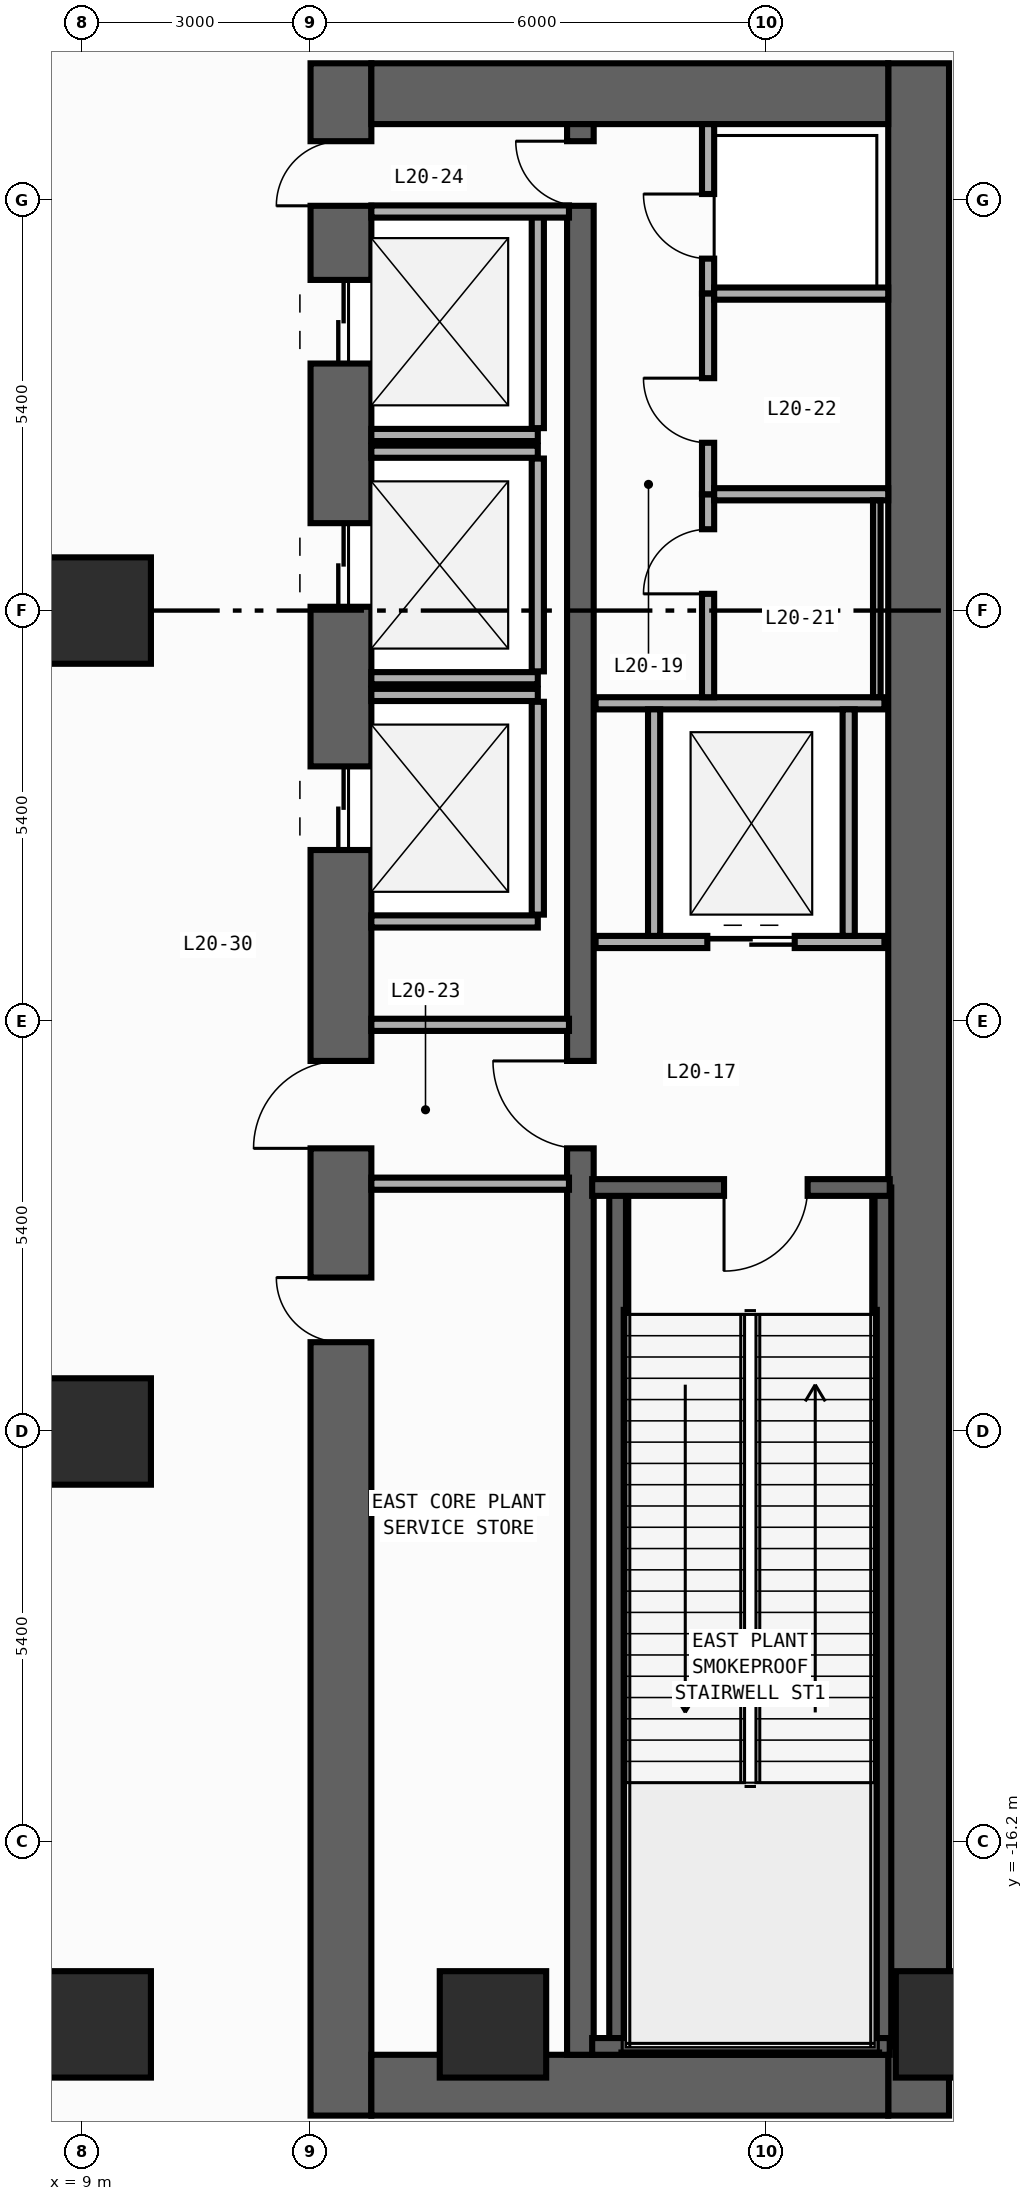
"""IFC4 building model, lengths in metres.
Left out: names, types, materials, properties, quantities, classifications, styles, units other than length and angle.
Written with IfcOpenShell. Run it as: python <this file> out.ifc"""

import sys

from ifc_helpers import new_model, si_unit, direction, frame, frame_2d, origin, origin_2d, place, context, subcontext, project, spatial, rectangle, extrude, element, fill, save


model = new_model("IFC4")
c1 = context("Model", 3, precision=1e-05, world=origin(), true_north=direction((0.0, 1.0)))
c2 = subcontext(c1, "Body", "Model", "MODEL_VIEW")
j1 = project(units=[si_unit("LENGTHUNIT", "METRE"), si_unit("PLANEANGLEUNIT", "RADIAN")], contexts=[c1])
p1 = place(None, origin())
s1 = spatial("IfcSite", under=j1, at=p1, CompositionType="ELEMENT")
p2 = place(p1, origin())
s2 = spatial("IfcBuilding", under=s1, at=p2, CompositionType="ELEMENT")
p3 = place(p2, frame((0.0, 0.0, 84.8)))
s3 = spatial("IfcBuildingStorey", under=s2, at=p3, CompositionType="ELEMENT", Elevation=84.8)
p4 = place(p3, frame((12.4, -19.8, 0.0), z_axis=(0.0, 0.0, 1.0), x_axis=(0.0, 1.0, 0.0)))
e1 = element("IfcWall", 1, at=p4, inside=s3, PredefinedType="SHEAR", context=c2, shape_type="SweptSolid", body=[
    extrude(rectangle(XDim=27.0, YDim=0.8, at=frame_2d((13.5, 0.0))), origin(), (0.0, 0.0, 1.0), 8.14),
])
p5 = place(p4, frame((23.05, 0.0, 0.0)))
e2 = element("IfcOpeningElement", 2, at=p5, cuts=e1, PredefinedType="OPENING", context=c2, shape_type="SweptSolid", body=[
    extrude(rectangle(XDim=1.1, YDim=2.2, at=frame_2d((0.55, 1.1))), frame((0.0, 0.41, 0.0), z_axis=(0.0, -1.0, 0.0), x_axis=(1.0, 0.0, 0.0)), (0.0, 0.0, 1.0), 0.82),
])
p6 = place(p4, frame((19.85, 0.0, 0.0)))
e3 = element("IfcOpeningElement", 3, at=p6, cuts=e1, PredefinedType="OPENING", context=c2, shape_type="SweptSolid", body=[
    extrude(rectangle(XDim=1.1, YDim=2.2, at=frame_2d((0.55, 1.1))), frame((0.0, 0.41, 0.0), z_axis=(0.0, -1.0, 0.0), x_axis=(1.0, 0.0, 0.0)), (0.0, 0.0, 1.0), 0.82),
])
p7 = place(p4, frame((16.65, 0.0, 0.0)))
e4 = element("IfcOpeningElement", 4, at=p7, cuts=e1, PredefinedType="OPENING", context=c2, shape_type="SweptSolid", body=[
    extrude(rectangle(XDim=1.1, YDim=2.2, at=frame_2d((0.55, 1.1))), frame((0.0, 0.41, 0.0), z_axis=(0.0, -1.0, 0.0), x_axis=(1.0, 0.0, 0.0)), (0.0, 0.0, 1.0), 0.82),
])
p8 = place(p4, frame((10.175, 0.0, 0.0)))
e5 = element("IfcOpeningElement", 5, at=p8, cuts=e1, PredefinedType="OPENING", context=c2, shape_type="SweptSolid", body=[
    extrude(rectangle(XDim=0.85, YDim=2.1, at=frame_2d((0.425, 1.05))), frame((0.0, 0.41, 0.0), z_axis=(0.0, -1.0, 0.0), x_axis=(1.0, 0.0, 0.0)), (0.0, 0.0, 1.0), 0.82),
])
p9 = place(p4, frame((12.725, 0.0, 0.0)))
e6 = element("IfcOpeningElement", 6, at=p9, cuts=e1, PredefinedType="OPENING", context=c2, shape_type="SweptSolid", body=[
    extrude(rectangle(XDim=1.15, YDim=2.2, at=frame_2d((0.575, 1.1))), frame((0.0, 0.41, 0.0), z_axis=(0.0, -1.0, 0.0), x_axis=(1.0, 0.0, 0.0)), (0.0, 0.0, 1.0), 0.82),
])
p10 = place(p4, frame((25.125, 0.0, 0.0)))
e7 = element("IfcOpeningElement", 7, at=p10, cuts=e1, PredefinedType="OPENING", context=c2, shape_type="SweptSolid", body=[
    extrude(rectangle(XDim=0.85, YDim=2.1, at=frame_2d((0.425, 1.05))), frame((0.0, 0.41, 0.0), z_axis=(0.0, -1.0, 0.0), x_axis=(1.0, 0.0, 0.0)), (0.0, 0.0, 1.0), 0.82),
])
p11 = place(p3, frame((20.0, -19.8, 0.0), z_axis=(0.0, 0.0, 1.0), x_axis=(0.0, 1.0, 0.0)))
e8 = element("IfcWall", 8, at=p11, inside=s3, PredefinedType="SHEAR", context=c2, shape_type="SweptSolid", body=[
    extrude(rectangle(XDim=27.0, YDim=0.8, at=frame_2d((13.5, 0.0))), origin(), (0.0, 0.0, 1.0), 8.14),
])
for number, where, z_axis, x_axis in (
    (9, (12.8, -19.4, 0.0), (0.0, 0.0, 1.0), (1.0, 0.0, 0.0)),
    (10, (12.8, 6.8, 0.0), (0.0, 0.0, 1.0), (1.0, 0.0, 0.0)),
):
    element("IfcWall", number, at=place(p3, frame(where, z_axis=z_axis, x_axis=x_axis)), inside=s3, PredefinedType="SHEAR", context=c2, shape_type="SweptSolid", body=[
        extrude(rectangle(XDim=6.8, YDim=0.8, at=frame_2d((3.4, 0.0))), origin(), (0.0, 0.0, 1.0), 8.14),
    ])
p12 = place(p3, frame((15.55, -19.0, 0.0), z_axis=(0.0, 0.0, 1.0), x_axis=(0.0, 1.0, 0.0)))
e11 = element("IfcWall", 11, at=p12, inside=s3, PredefinedType="SHEAR", context=c2, shape_type="SweptSolid", body=[
    extrude(rectangle(XDim=25.4, YDim=0.35, at=frame_2d((12.7, 0.0))), origin(), (0.0, 0.0, 1.0), 8.14),
])
p13 = place(p12, frame((11.925, 0.0, 0.0)))
e12 = element("IfcOpeningElement", 12, at=p13, cuts=e11, PredefinedType="OPENING", context=c2, shape_type="SweptSolid", body=[
    extrude(rectangle(XDim=1.15, YDim=2.2, at=frame_2d((0.575, 1.1))), frame((0.0, 0.185, 0.0), z_axis=(0.0, -1.0, 0.0), x_axis=(1.0, 0.0, 0.0)), (0.0, 0.0, 1.0), 0.37),
])
p14 = place(p12, frame((24.325, 0.0, 0.0)))
e13 = element("IfcOpeningElement", 13, at=p14, cuts=e11, PredefinedType="OPENING", context=c2, shape_type="SweptSolid", body=[
    extrude(rectangle(XDim=0.85, YDim=2.1, at=frame_2d((0.425, 1.05))), frame((0.0, 0.185, 0.0), z_axis=(0.0, -1.0, 0.0), x_axis=(1.0, 0.0, 0.0)), (0.0, 0.0, 1.0), 0.37),
])
for number, where, z_axis, x_axis in (
    (14, (16.04, -18.89, 0.0), (0.0, 0.0, 1.0), (0.0, 1.0, 0.0)),
    (15, (19.53, -18.89, 0.0), (0.0, 0.0, 1.0), (0.0, 1.0, 0.0)),
):
    element("IfcWall", number, at=place(p3, frame(where, z_axis=z_axis, x_axis=x_axis)), inside=s3, PredefinedType="SHEAR", context=c2, shape_type="SweptSolid", body=[
        extrude(rectangle(XDim=11.3, YDim=0.22, at=frame_2d((5.65, 0.0))), origin(), (0.0, 0.0, 1.0), 8.14),
    ])
p15 = place(p3, frame((15.705, -18.89, 0.0), z_axis=(0.0, 0.0, 1.0), x_axis=(1.0, 0.0, 0.0)))
e16 = element("IfcWall", 16, at=p15, inside=s3, PredefinedType="SHEAR", context=c2, shape_type="SweptSolid", body=[
    extrude(rectangle(XDim=3.915, YDim=0.22, at=frame_2d((1.958, 0.0))), origin(), (0.0, 0.0, 1.0), 8.14),
])
p16 = place(p3, frame((19.62, -7.59, 0.0), z_axis=(0.0, 0.0, 1.0), x_axis=(-1.0, 0.0, 0.0)))
e17 = element("IfcWall", 17, at=p16, inside=s3, PredefinedType="SHEAR", context=c2, shape_type="SweptSolid", body=[
    extrude(rectangle(XDim=3.915, YDim=0.22, at=frame_2d((1.958, 0.0))), origin(), (0.0, 0.0, 1.0), 8.14),
])
p17 = place(p16, frame((1.08, 0.0, 0.0)))
e18 = element("IfcOpeningElement", 18, at=p17, cuts=e17, PredefinedType="OPENING", context=c2, shape_type="SweptSolid", body=[
    extrude(rectangle(XDim=1.1, YDim=2.2, at=frame_2d((0.55, 1.1))), frame((0.0, 0.12, 0.0), z_axis=(0.0, -1.0, 0.0), x_axis=(1.0, 0.0, 0.0)), (0.0, 0.0, 1.0), 0.24),
])
for number, where, z_axis, x_axis in (
    (19, (9.2, -18.6, 0.0), (0.0, 0.0, 1.0), (1.0, 0.0, 0.0)),
    (20, (9.2, -10.8, 0.0), (0.0, 0.0, 1.0), (1.0, 0.0, 0.0)),
    (21, (9.2, 0.0, 0.0), (0.0, 0.0, 1.0), (1.0, 0.0, 0.0)),
    (22, (20.4, -18.6, 0.0), (0.0, 0.0, 1.0), (1.0, 0.0, 0.0)),
    (23, (14.4, -18.6, 0.0), (0.0, 0.0, 1.0), (1.0, 0.0, 0.0)),
):
    element("IfcColumn", number, at=place(p3, frame(where, z_axis=z_axis, x_axis=x_axis)), inside=s3, PredefinedType="COLUMN", context=c2, shape_type="SweptSolid", body=[
        extrude(rectangle(XDim=1.4, YDim=1.4, at=origin_2d()), origin(), (0.0, 0.0, 1.0), 8.4),
    ])
p18 = place(p3, frame((12.8, 2.31, 0.0), z_axis=(0.0, 0.0, 1.0), x_axis=(1.0, 0.0, 0.0)))
e24 = element("IfcWall", 24, at=p18, inside=s3, PredefinedType="STANDARD", context=c2, shape_type="SweptSolid", body=[
    extrude(rectangle(XDim=2.19, YDim=0.16, at=frame_2d((1.095, 0.0))), origin(), (0.0, 0.0, 1.0), 8.14),
])
p19 = place(p3, frame((14.99, 2.4, 0.0), z_axis=(0.0, 0.0, 1.0), x_axis=(0.0, 1.0, 0.0)))
e25 = element("IfcWall", 25, at=p19, inside=s3, PredefinedType="STANDARD", context=c2, shape_type="SweptSolid", body=[
    extrude(rectangle(XDim=2.8, YDim=0.16, at=frame_2d((1.4, 0.0))), origin(), (0.0, 0.0, 1.0), 8.14),
])
for number, where, z_axis, x_axis in (
    (26, (12.8, -0.89, 0.0), (0.0, 0.0, 1.0), (1.0, 0.0, 0.0)),
    (27, (12.8, 2.09, 0.0), (0.0, 0.0, 1.0), (1.0, 0.0, 0.0)),
):
    element("IfcWall", number, at=place(p3, frame(where, z_axis=z_axis, x_axis=x_axis)), inside=s3, PredefinedType="STANDARD", context=c2, shape_type="SweptSolid", body=[
        extrude(rectangle(XDim=2.19, YDim=0.16, at=frame_2d((1.095, 0.0))), origin(), (0.0, 0.0, 1.0), 8.14),
    ])
p20 = place(p3, frame((14.99, -0.8, 0.0), z_axis=(0.0, 0.0, 1.0), x_axis=(0.0, 1.0, 0.0)))
e28 = element("IfcWall", 28, at=p20, inside=s3, PredefinedType="STANDARD", context=c2, shape_type="SweptSolid", body=[
    extrude(rectangle(XDim=2.8, YDim=0.16, at=frame_2d((1.4, 0.0))), origin(), (0.0, 0.0, 1.0), 8.14),
])
for number, where, z_axis, x_axis in (
    (29, (12.8, -4.09, 0.0), (0.0, 0.0, 1.0), (1.0, 0.0, 0.0)),
    (30, (12.8, -1.11, 0.0), (0.0, 0.0, 1.0), (1.0, 0.0, 0.0)),
):
    element("IfcWall", number, at=place(p3, frame(where, z_axis=z_axis, x_axis=x_axis)), inside=s3, PredefinedType="STANDARD", context=c2, shape_type="SweptSolid", body=[
        extrude(rectangle(XDim=2.19, YDim=0.16, at=frame_2d((1.095, 0.0))), origin(), (0.0, 0.0, 1.0), 8.14),
    ])
p21 = place(p3, frame((14.99, -4.0, 0.0), z_axis=(0.0, 0.0, 1.0), x_axis=(0.0, 1.0, 0.0)))
e31 = element("IfcWall", 31, at=p21, inside=s3, PredefinedType="STANDARD", context=c2, shape_type="SweptSolid", body=[
    extrude(rectangle(XDim=2.8, YDim=0.16, at=frame_2d((1.4, 0.0))), origin(), (0.0, 0.0, 1.0), 8.14),
])
p22 = place(p3, frame((15.75, -4.36, 0.0), z_axis=(0.0, 0.0, 1.0), x_axis=(1.0, 0.0, 0.0)))
e32 = element("IfcWall", 32, at=p22, inside=s3, PredefinedType="STANDARD", context=c2, shape_type="SweptSolid", body=[
    extrude(rectangle(XDim=3.8, YDim=0.16, at=frame_2d((1.9, 0.0))), origin(), (0.0, 0.0, 1.0), 8.14),
])
p23 = place(p22, frame((1.47, 0.0, 0.0)))
e33 = element("IfcOpeningElement", 33, at=p23, cuts=e32, PredefinedType="OPENING", context=c2, shape_type="SweptSolid", body=[
    extrude(rectangle(XDim=1.15, YDim=2.2, at=frame_2d((0.575, 1.1))), frame((0.0, 0.09, 0.0), z_axis=(0.0, -1.0, 0.0), x_axis=(1.0, 0.0, 0.0)), (0.0, 0.0, 1.0), 0.18),
])
p24 = place(p3, frame((15.75, -1.22, 0.0), z_axis=(0.0, 0.0, 1.0), x_axis=(1.0, 0.0, 0.0)))
e34 = element("IfcWall", 34, at=p24, inside=s3, PredefinedType="STANDARD", context=c2, shape_type="SweptSolid", body=[
    extrude(rectangle(XDim=3.8, YDim=0.16, at=frame_2d((1.9, 0.0))), origin(), (0.0, 0.0, 1.0), 8.14),
])
for number, where, z_axis, x_axis in (
    (35, (16.52, -4.28, 0.0), (0.0, 0.0, 1.0), (0.0, 1.0, 0.0)),
    (36, (19.08, -4.28, 0.0), (0.0, 0.0, 1.0), (0.0, 1.0, 0.0)),
):
    element("IfcWall", number, at=place(p3, frame(where, z_axis=z_axis, x_axis=x_axis)), inside=s3, PredefinedType="STANDARD", context=c2, shape_type="SweptSolid", body=[
        extrude(rectangle(XDim=2.98, YDim=0.16, at=frame_2d((1.49, 0.0))), origin(), (0.0, 0.0, 1.0), 8.14),
    ])
for number, where, z_axis, x_axis in (
    (37, (12.8, -5.45, 0.0), (0.0, 0.0, 1.0), (1.0, 0.0, 0.0)),
    (38, (12.8, -7.54, 0.0), (0.0, 0.0, 1.0), (1.0, 0.0, 0.0)),
    (39, (12.8, 5.25, 0.0), (0.0, 0.0, 1.0), (1.0, 0.0, 0.0)),
):
    element("IfcWall", number, at=place(p3, frame(where, z_axis=z_axis, x_axis=x_axis)), inside=s3, PredefinedType="STANDARD", context=c2, shape_type="SweptSolid", body=[
        extrude(rectangle(XDim=2.6, YDim=0.16, at=frame_2d((1.3, 0.0))), origin(), (0.0, 0.0, 1.0), 8.14),
    ])
p25 = place(p3, frame((17.23, 4.17, 0.0), z_axis=(0.0, 0.0, 1.0), x_axis=(0.0, 1.0, 0.0)))
e40 = element("IfcWall", 40, at=p25, inside=s3, PredefinedType="PARTITIONING", context=c2, shape_type="SweptSolid", body=[
    extrude(rectangle(XDim=2.23, YDim=0.16, at=frame_2d((1.115, 0.0))), origin(), (0.0, 0.0, 1.0), 8.14),
])
p26 = place(p25, frame((0.46, 0.0, 0.0)))
e41 = element("IfcOpeningElement", 41, at=p26, cuts=e40, PredefinedType="OPENING", context=c2, shape_type="SweptSolid", body=[
    extrude(rectangle(XDim=0.85, YDim=2.1, at=frame_2d((0.425, 1.05))), frame((0.0, 0.09, 0.0), z_axis=(0.0, -1.0, 0.0), x_axis=(1.0, 0.0, 0.0)), (0.0, 0.0, 1.0), 0.18),
])
p27 = place(p3, frame((17.23, -1.14, 0.0), z_axis=(0.0, 0.0, 1.0), x_axis=(0.0, 1.0, 0.0)))
e42 = element("IfcWall", 42, at=p27, inside=s3, PredefinedType="PARTITIONING", context=c2, shape_type="SweptSolid", body=[
    extrude(rectangle(XDim=2.67, YDim=0.16, at=frame_2d((1.335, 0.0))), origin(), (0.0, 0.0, 1.0), 8.14),
])
p28 = place(p27, frame((1.36, 0.0, 0.0)))
e43 = element("IfcOpeningElement", 43, at=p28, cuts=e42, PredefinedType="OPENING", context=c2, shape_type="SweptSolid", body=[
    extrude(rectangle(XDim=0.85, YDim=2.1, at=frame_2d((0.425, 1.05))), frame((0.0, 0.09, 0.0), z_axis=(0.0, -1.0, 0.0), x_axis=(1.0, 0.0, 0.0)), (0.0, 0.0, 1.0), 0.18),
])
p29 = place(p3, frame((17.23, 1.53, 0.0), z_axis=(0.0, 0.0, 1.0), x_axis=(0.0, 1.0, 0.0)))
e44 = element("IfcWall", 44, at=p29, inside=s3, PredefinedType="PARTITIONING", context=c2, shape_type="SweptSolid", body=[
    extrude(rectangle(XDim=2.64, YDim=0.16, at=frame_2d((1.32, 0.0))), origin(), (0.0, 0.0, 1.0), 8.14),
])
p30 = place(p29, frame((0.677, 0.0, 0.0)))
e45 = element("IfcOpeningElement", 45, at=p30, cuts=e44, PredefinedType="OPENING", context=c2, shape_type="SweptSolid", body=[
    extrude(rectangle(XDim=0.85, YDim=2.1, at=frame_2d((0.425, 1.05))), frame((0.0, 0.09, 0.0), z_axis=(0.0, -1.0, 0.0), x_axis=(1.0, 0.0, 0.0)), (0.0, 0.0, 1.0), 0.18),
])
for number, where, z_axis, x_axis in (
    (46, (17.31, 4.17, 0.0), (0.0, 0.0, 1.0), (1.0, 0.0, 0.0)),
    (47, (17.31, 1.53, 0.0), (0.0, 0.0, 1.0), (1.0, 0.0, 0.0)),
):
    element("IfcWall", number, at=place(p3, frame(where, z_axis=z_axis, x_axis=x_axis)), inside=s3, PredefinedType="PARTITIONING", context=c2, shape_type="SweptSolid", body=[
        extrude(rectangle(XDim=2.29, YDim=0.16, at=frame_2d((1.145, 0.0))), origin(), (0.0, 0.0, 1.0), 8.14),
    ])
p31 = place(p3, frame((19.45, 1.45, 0.0), z_axis=(0.0, 0.0, 1.0), x_axis=(0.0, -1.0, 0.0)))
e48 = element("IfcWall", 48, at=p31, inside=s3, PredefinedType="PARTITIONING", context=c2, shape_type="SweptSolid", body=[
    extrude(rectangle(XDim=2.59, YDim=0.1, at=frame_2d((1.295, 0.0))), origin(), (0.0, 0.0, 1.0), 8.14),
])
p32 = place(p17, origin())
e49 = element("IfcDoor", 49, at=p32, inside=s3, OperationType="SINGLE_SWING_RIGHT", PredefinedType="DOOR", context=c2, shape_type="SweptSolid", body=[
    extrude(rectangle(XDim=1.1, YDim=2.2, at=frame_2d((0.55, 1.1))), frame((0.0, 0.025, 0.0), z_axis=(0.0, -1.0, 0.0), x_axis=(1.0, 0.0, 0.0)), (0.0, 0.0, 1.0), 0.05),
])
fill(e18, e49)
p33 = place(p5, origin())
e50 = element("IfcDoor", 50, at=p33, inside=s3, OperationType="DOUBLE_DOOR_SLIDING", PredefinedType="DOOR", context=c2, shape_type="SweptSolid", body=[
    extrude(rectangle(XDim=1.1, YDim=2.2, at=frame_2d((0.55, 1.1))), frame((0.0, 0.025, 0.0), z_axis=(0.0, -1.0, 0.0), x_axis=(1.0, 0.0, 0.0)), (0.0, 0.0, 1.0), 0.05),
])
fill(e2, e50)
p34 = place(p6, origin())
e51 = element("IfcDoor", 51, at=p34, inside=s3, OperationType="DOUBLE_DOOR_SLIDING", PredefinedType="DOOR", context=c2, shape_type="SweptSolid", body=[
    extrude(rectangle(XDim=1.1, YDim=2.2, at=frame_2d((0.55, 1.1))), frame((0.0, 0.025, 0.0), z_axis=(0.0, -1.0, 0.0), x_axis=(1.0, 0.0, 0.0)), (0.0, 0.0, 1.0), 0.05),
])
fill(e3, e51)
p35 = place(p7, origin())
e52 = element("IfcDoor", 52, at=p35, inside=s3, OperationType="DOUBLE_DOOR_SLIDING", PredefinedType="DOOR", context=c2, shape_type="SweptSolid", body=[
    extrude(rectangle(XDim=1.1, YDim=2.2, at=frame_2d((0.55, 1.1))), frame((0.0, 0.025, 0.0), z_axis=(0.0, -1.0, 0.0), x_axis=(1.0, 0.0, 0.0)), (0.0, 0.0, 1.0), 0.05),
])
fill(e4, e52)
p36 = place(p8, origin())
e53 = element("IfcDoor", 53, at=p36, inside=s3, OperationType="SINGLE_SWING_RIGHT", PredefinedType="DOOR", context=c2, shape_type="SweptSolid", body=[
    extrude(rectangle(XDim=0.85, YDim=2.1, at=frame_2d((0.425, 1.05))), frame((0.0, 0.025, 0.0), z_axis=(0.0, -1.0, 0.0), x_axis=(1.0, 0.0, 0.0)), (0.0, 0.0, 1.0), 0.05),
])
fill(e5, e53)
p37 = place(p9, origin())
e54 = element("IfcDoor", 54, at=p37, inside=s3, OperationType="SINGLE_SWING_LEFT", PredefinedType="DOOR", context=c2, shape_type="SweptSolid", body=[
    extrude(rectangle(XDim=1.15, YDim=2.2, at=frame_2d((0.575, 1.1))), frame((0.0, 0.025, 0.0), z_axis=(0.0, -1.0, 0.0), x_axis=(1.0, 0.0, 0.0)), (0.0, 0.0, 1.0), 0.05),
])
fill(e6, e54)
p38 = place(p13, origin())
e55 = element("IfcDoor", 55, at=p38, inside=s3, OperationType="SINGLE_SWING_RIGHT", PredefinedType="DOOR", context=c2, shape_type="SweptSolid", body=[
    extrude(rectangle(XDim=1.15, YDim=2.2, at=frame_2d((0.575, 1.1))), frame((0.0, 0.025, 0.0), z_axis=(0.0, -1.0, 0.0), x_axis=(1.0, 0.0, 0.0)), (0.0, 0.0, 1.0), 0.05),
])
fill(e12, e55)
p39 = place(p10, origin())
e56 = element("IfcDoor", 56, at=p39, inside=s3, OperationType="SINGLE_SWING_LEFT", PredefinedType="DOOR", context=c2, shape_type="SweptSolid", body=[
    extrude(rectangle(XDim=0.85, YDim=2.1, at=frame_2d((0.425, 1.05))), frame((0.0, 0.025, 0.0), z_axis=(0.0, -1.0, 0.0), x_axis=(1.0, 0.0, 0.0)), (0.0, 0.0, 1.0), 0.05),
])
fill(e7, e56)
p40 = place(p14, origin())
e57 = element("IfcDoor", 57, at=p40, inside=s3, OperationType="SINGLE_SWING_RIGHT", PredefinedType="DOOR", context=c2, shape_type="SweptSolid", body=[
    extrude(rectangle(XDim=0.85, YDim=2.1, at=frame_2d((0.425, 1.05))), frame((0.0, 0.025, 0.0), z_axis=(0.0, -1.0, 0.0), x_axis=(1.0, 0.0, 0.0)), (0.0, 0.0, 1.0), 0.05),
])
fill(e13, e57)
p41 = place(p23, origin())
e58 = element("IfcDoor", 58, at=p41, inside=s3, OperationType="DOUBLE_DOOR_SLIDING", PredefinedType="DOOR", context=c2, shape_type="SweptSolid", body=[
    extrude(rectangle(XDim=1.15, YDim=2.2, at=frame_2d((0.575, 1.1))), frame((0.0, 0.025, 0.0), z_axis=(0.0, -1.0, 0.0), x_axis=(1.0, 0.0, 0.0)), (0.0, 0.0, 1.0), 0.05),
])
fill(e33, e58)
p42 = place(p26, origin())
e59 = element("IfcDoor", 59, at=p42, inside=s3, OperationType="SINGLE_SWING_RIGHT", PredefinedType="DOOR", context=c2, shape_type="SweptSolid", body=[
    extrude(rectangle(XDim=0.85, YDim=2.1, at=frame_2d((0.425, 1.05))), frame((0.0, 0.025, 0.0), z_axis=(0.0, -1.0, 0.0), x_axis=(1.0, 0.0, 0.0)), (0.0, 0.0, 1.0), 0.05),
])
fill(e41, e59)
p43 = place(p28, origin())
e60 = element("IfcDoor", 60, at=p43, inside=s3, OperationType="SINGLE_SWING_LEFT", PredefinedType="DOOR", context=c2, shape_type="SweptSolid", body=[
    extrude(rectangle(XDim=0.85, YDim=2.1, at=frame_2d((0.425, 1.05))), frame((0.0, 0.025, 0.0), z_axis=(0.0, -1.0, 0.0), x_axis=(1.0, 0.0, 0.0)), (0.0, 0.0, 1.0), 0.05),
])
fill(e43, e60)
p44 = place(p30, origin())
e61 = element("IfcDoor", 61, at=p44, inside=s3, OperationType="SINGLE_SWING_RIGHT", PredefinedType="DOOR", context=c2, shape_type="SweptSolid", body=[
    extrude(rectangle(XDim=0.85, YDim=2.1, at=frame_2d((0.425, 1.05))), frame((0.0, 0.025, 0.0), z_axis=(0.0, -1.0, 0.0), x_axis=(1.0, 0.0, 0.0)), (0.0, 0.0, 1.0), 0.05),
])
fill(e45, e61)
save(model, sys.argv[1])
